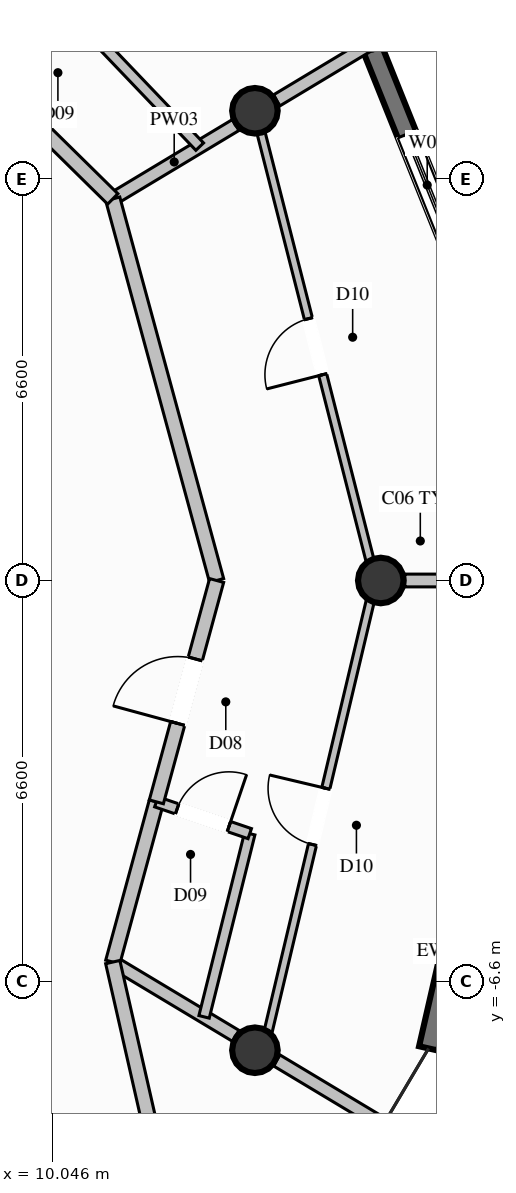
"""IFC4 building model, lengths in metres.
Left out: names, types, materials, properties, quantities, classifications, styles, units other than length and angle.
Written with IfcOpenShell. Run it as: python <this file> out.ifc"""

import sys

from ifc_helpers import new_model, si_unit, direction, frame, frame_2d, origin, origin_2d, place, context, subcontext, project, spatial, rectangle, circle, extrude, element, fill, save


model = new_model("IFC4")
c1 = context("Model", 3, precision=1e-05, world=origin(), true_north=direction((0.0, 1.0)))
c2 = subcontext(c1, "Body", "Model", "MODEL_VIEW")
j1 = project(units=[si_unit("LENGTHUNIT", "METRE"), si_unit("PLANEANGLEUNIT", "RADIAN")], contexts=[c1])
p1 = place(None, origin())
s1 = spatial("IfcSite", under=j1, at=p1, CompositionType="ELEMENT")
p2 = place(p1, origin())
s2 = spatial("IfcBuilding", under=s1, at=p2, CompositionType="ELEMENT")
p3 = place(p2, frame((0.0, 0.0, 246.8)))
s3 = spatial("IfcBuildingStorey", under=s2, at=p3, CompositionType="ELEMENT", Elevation=246.8)
for number, where, z_axis, x_axis in (
    (1, (15.45, 0.0, 0.0), (0.0, 0.0, 1.0), (1.0, 0.0, 0.0)),
    (2, (13.38, 7.725, 0.0), (0.0, 0.0, 1.0), (1.0, 0.0, 0.0)),
    (3, (13.38, -7.725, 0.0), (0.0, 0.0, 1.0), (1.0, 0.0, 0.0)),
):
    element("IfcColumn", number, at=place(p3, frame(where, z_axis=z_axis, x_axis=x_axis)), inside=s3, PredefinedType="COLUMN", context=c2, shape_type="SweptSolid", body=[
        extrude(circle(Radius=0.375, at=origin_2d()), origin(), (0.0, 0.0, 1.0), 3.8),
    ])
p4 = place(p3, frame((17.587, -1.795, 0.0), z_axis=(0.0, 0.0, 1.0), x_axis=(-0.223174159959, -0.974778587335, 0.0)))
e4 = element("IfcWall", 4, at=p4, inside=s3, PredefinedType="SOLIDWALL", context=c2, shape_type="SweptSolid", body=[
    extrude(rectangle(XDim=6.053, YDim=0.32, at=frame_2d((3.026, 0.0))), origin(), (0.0, 0.0, 1.0), 3.57),
])
p5 = place(p4, frame((2.126, 0.0, 0.35)))
e5 = element("IfcOpeningElement", 5, at=p5, cuts=e4, PredefinedType="OPENING", context=c2, shape_type="SweptSolid", body=[
    extrude(rectangle(XDim=1.8, YDim=2.6, at=frame_2d((0.9, 1.3))), frame((0.0, 0.17, 0.0), z_axis=(0.0, -1.0, 0.0), x_axis=(1.0, 0.0, 0.0)), (0.0, 0.0, 1.0), 0.34),
])
p6 = place(p3, frame((14.835, 9.939, 0.0), z_axis=(0.0, 0.0, 1.0), x_axis=(0.372412492589, -0.928067311871, 0.0)))
e6 = element("IfcWall", 6, at=p6, inside=s3, PredefinedType="SOLIDWALL", context=c2, shape_type="SweptSolid", body=[
    extrude(rectangle(XDim=6.095, YDim=0.32, at=frame_2d((3.048, 0.0))), origin(), (0.0, 0.0, 1.0), 3.57),
])
p7 = place(p6, frame((2.802, 0.0, 0.35)))
e7 = element("IfcOpeningElement", 7, at=p7, cuts=e6, PredefinedType="OPENING", context=c2, shape_type="SweptSolid", body=[
    extrude(rectangle(XDim=1.8, YDim=2.6, at=frame_2d((0.9, 1.3))), frame((0.0, 0.17, 0.0), z_axis=(0.0, -1.0, 0.0), x_axis=(1.0, 0.0, 0.0)), (0.0, 0.0, 1.0), 0.34),
])
p8 = place(p3, frame((11.042, 6.275, 0.0), z_axis=(0.0, 0.0, 1.0), x_axis=(0.857026686246, 0.515272024335, 0.0)))
e8 = element("IfcWall", 8, at=p8, inside=s3, PredefinedType="PARTITIONING", context=c2, shape_type="SweptSolid", body=[
    extrude(rectangle(XDim=2.358, YDim=0.21, at=frame_2d((1.179, 0.0))), origin(), (0.0, 0.0, 1.0), 3.011),
])
p9 = place(p3, frame((13.737, 7.895, 0.0), z_axis=(0.0, 0.0, 1.0), x_axis=(0.857150569961, 0.515065918514, 0.0)))
e9 = element("IfcWall", 9, at=p9, inside=s3, PredefinedType="PARTITIONING", context=c2, shape_type="SweptSolid", body=[
    extrude(rectangle(XDim=1.763, YDim=0.21, at=frame_2d((0.881, 0.0))), origin(), (0.0, 0.0, 1.0), 3.57),
])
p10 = place(p3, frame((11.042, -6.275, 0.0), z_axis=(0.0, 0.0, 1.0), x_axis=(0.857502061287, -0.514480529164, 0.0)))
e10 = element("IfcWall", 10, at=p10, inside=s3, PredefinedType="PARTITIONING", context=c2, shape_type="SweptSolid", body=[
    extrude(rectangle(XDim=2.358, YDim=0.21, at=frame_2d((1.179, 0.0))), origin(), (0.0, 0.0, 1.0), 3.011),
])
p11 = place(p3, frame((13.738, -7.892, 0.0), z_axis=(0.0, 0.0, 1.0), x_axis=(0.857407053578, -0.514638848587, 0.0)))
e11 = element("IfcWall", 11, at=p11, inside=s3, PredefinedType="PARTITIONING", context=c2, shape_type="SweptSolid", body=[
    extrude(rectangle(XDim=2.007, YDim=0.21, at=frame_2d((1.003, 0.0))), origin(), (0.0, 0.0, 1.0), 3.57),
])
p12 = place(p3, frame((11.042, -6.275, 0.0), z_axis=(0.0, 0.0, 1.0), x_axis=(0.262572701387, 0.964912211803, 0.0)))
e12 = element("IfcWall", 12, at=p12, inside=s3, PredefinedType="PARTITIONING", context=c2, shape_type="SweptSolid", body=[
    extrude(rectangle(XDim=2.731, YDim=0.24, at=frame_2d((1.365, 0.0))), origin(), (0.0, 0.0, 1.0), 3.57),
])
p13 = place(p3, frame((12.544, -7.176, 0.0), z_axis=(0.0, 0.0, 1.0), x_axis=(0.241851063072, 0.970313384062, 0.0)))
e13 = element("IfcWall", 13, at=p13, inside=s3, PredefinedType="PLUMBINGWALL", context=c2, shape_type="SweptSolid", body=[
    extrude(rectangle(XDim=3.105, YDim=0.175, at=frame_2d((1.553, 0.0))), origin(), (0.0, 0.0, 1.0), 3.57),
])
p14 = place(p3, frame((11.759, -3.64, 0.0), z_axis=(0.0, 0.0, 1.0), x_axis=(0.946586404748, -0.322450272671, 0.0)))
e14 = element("IfcWall", 14, at=p14, inside=s3, PredefinedType="PLUMBINGWALL", context=c2, shape_type="SweptSolid", body=[
    extrude(rectangle(XDim=1.623, YDim=0.175, at=frame_2d((0.811, 0.0))), origin(), (0.0, 0.0, 1.0), 3.57),
])
p15 = place(p14, frame((0.361, 0.0, 0.0)))
e15 = element("IfcOpeningElement", 15, at=p15, cuts=e14, PredefinedType="OPENING", context=c2, shape_type="SweptSolid", body=[
    extrude(rectangle(XDim=0.9, YDim=2.1, at=frame_2d((0.45, 1.05))), frame((0.0, 0.098, 0.0), z_axis=(0.0, -1.0, 0.0), x_axis=(1.0, 0.0, 0.0)), (0.0, 0.0, 1.0), 0.195),
])
p16 = place(p3, frame((15.845, 0.0, 0.0), z_axis=(0.0, 0.0, 1.0), x_axis=(1.0, 0.0, 0.0)))
e16 = element("IfcWall", 16, at=p16, inside=s3, PredefinedType="PARTITIONING", context=c2, shape_type="SweptSolid", body=[
    extrude(rectangle(XDim=1.56, YDim=0.21, at=frame_2d((0.78, 0.0))), origin(), (0.0, 0.0, 1.0), 3.57),
])
p17 = place(p3, frame((12.75, 0.0, 0.0), z_axis=(0.0, 0.0, 1.0), x_axis=(-0.262640884433, 0.964893655189, 0.0)))
e17 = element("IfcWall", 17, at=p17, inside=s3, PredefinedType="PARTITIONING", context=c2, shape_type="SweptSolid", body=[
    extrude(rectangle(XDim=6.503, YDim=0.24, at=frame_2d((3.251, 0.0))), origin(), (0.0, 0.0, 1.0), 3.57),
])
p18 = place(p3, frame((11.759, -3.64, 0.0), z_axis=(0.0, 0.0, 1.0), x_axis=(0.2626902414, 0.964880219029, 0.0)))
e18 = element("IfcWall", 18, at=p18, inside=s3, PredefinedType="PARTITIONING", context=c2, shape_type="SweptSolid", body=[
    extrude(rectangle(XDim=3.772, YDim=0.24, at=frame_2d((1.886, 0.0))), origin(), (0.0, 0.0, 1.0), 3.57),
])
p19 = place(p18, frame((1.336, 0.0, 0.0)))
e19 = element("IfcOpeningElement", 19, at=p19, cuts=e18, PredefinedType="OPENING", context=c2, shape_type="SweptSolid", body=[
    extrude(rectangle(XDim=1.1, YDim=2.3, at=frame_2d((0.55, 1.15))), frame((0.0, 0.13, 0.0), z_axis=(0.0, -1.0, 0.0), x_axis=(1.0, 0.0, 0.0)), (0.0, 0.0, 1.0), 0.26),
])
p20 = place(p3, frame((13.516, -7.759, 0.0), z_axis=(0.0, 0.0, 1.0), x_axis=(0.230840940032, 0.972991500685, 0.0)))
e20 = element("IfcWall", 20, at=p20, inside=s3, PredefinedType="PARTITIONING", context=c2, shape_type="SweptSolid", body=[
    extrude(rectangle(XDim=7.974, YDim=0.135, at=frame_2d((3.987, 0.0))), origin(), (0.0, 0.0, 1.0), 3.139),
])
p21 = place(p20, frame((3.512, 0.0, 0.0)))
e21 = element("IfcOpeningElement", 21, at=p21, cuts=e20, PredefinedType="OPENING", context=c2, shape_type="SweptSolid", body=[
    extrude(rectangle(XDim=0.95, YDim=2.1, at=frame_2d((0.475, 1.05))), frame((0.0, 0.078, 0.0), z_axis=(0.0, -1.0, 0.0), x_axis=(1.0, 0.0, 0.0)), (0.0, 0.0, 1.0), 0.155),
])
p22 = place(p3, frame((15.357, 0.0, 0.0), z_axis=(0.0, 0.0, 1.0), x_axis=(-0.246948201866, 0.969028681513, 0.0)))
e22 = element("IfcWall", 22, at=p22, inside=s3, PredefinedType="PARTITIONING", context=c2, shape_type="SweptSolid", body=[
    extrude(rectangle(XDim=7.937, YDim=0.135, at=frame_2d((3.968, 0.0))), origin(), (0.0, 0.0, 1.0), 3.139),
])
p23 = place(p22, frame((3.493, 0.0, 0.0)))
e23 = element("IfcOpeningElement", 23, at=p23, cuts=e22, PredefinedType="OPENING", context=c2, shape_type="SweptSolid", body=[
    extrude(rectangle(XDim=0.95, YDim=2.1, at=frame_2d((0.475, 1.05))), frame((0.0, 0.078, 0.0), z_axis=(0.0, -1.0, 0.0), x_axis=(1.0, 0.0, 0.0)), (0.0, 0.0, 1.0), 0.155),
])
p24 = place(p3, frame((11.042, 6.275, 0.0), z_axis=(0.0, 0.0, 1.0), x_axis=(-0.712677423321, 0.701491903224, 0.0)))
e24 = element("IfcWall", 24, at=p24, inside=s3, PredefinedType="PARTITIONING", context=c2, shape_type="SweptSolid", body=[
    extrude(rectangle(XDim=2.75, YDim=0.24, at=frame_2d((1.375, 0.0))), origin(), (0.0, 0.0, 1.0), 3.57),
])
p25 = place(p3, frame((12.472, 7.135, 0.0), z_axis=(0.0, 0.0, 1.0), x_axis=(-0.690671718567, 0.723168429324, 0.0)))
e25 = element("IfcWall", 25, at=p25, inside=s3, PredefinedType="PLUMBINGWALL", context=c2, shape_type="SweptSolid", body=[
    extrude(rectangle(XDim=3.14, YDim=0.175, at=frame_2d((1.57, 0.0))), origin(), (0.0, 0.0, 1.0), 3.57),
])
p26 = place(p3, frame((9.082, 8.204, 0.0), z_axis=(0.0, 0.0, 1.0), x_axis=(0.712642440828, 0.701527441751, 0.0)))
e26 = element("IfcWall", 26, at=p26, inside=s3, PredefinedType="PLUMBINGWALL", context=c2, shape_type="SweptSolid", body=[
    extrude(rectangle(XDim=1.713, YDim=0.175, at=frame_2d((0.857, 0.0))), origin(), (0.0, 0.0, 1.0), 3.57),
])
p27 = place(p26, frame((0.407, 0.0, 0.0)))
e27 = element("IfcOpeningElement", 27, at=p27, cuts=e26, PredefinedType="OPENING", context=c2, shape_type="SweptSolid", body=[
    extrude(rectangle(XDim=0.9, YDim=2.1, at=frame_2d((0.45, 1.05))), frame((0.0, 0.098, 0.0), z_axis=(0.0, -1.0, 0.0), x_axis=(1.0, 0.0, 0.0)), (0.0, 0.0, 1.0), 0.195),
])
p28 = place(p3, frame((12.3, -11.8, 0.0), z_axis=(0.0, 0.0, 1.0), x_axis=(-0.222014008723, 0.975043475918, 0.0)))
e28 = element("IfcWall", 28, at=p28, inside=s3, PredefinedType="PARTITIONING", context=c2, shape_type="SweptSolid", body=[
    extrude(rectangle(XDim=5.667, YDim=0.24, at=frame_2d((2.833, 0.0))), origin(), (0.0, 0.0, 1.0), 3.57),
])
p29 = place(p7, origin())
e29 = element("IfcWindow", 29, at=p29, inside=s3, PartitioningType="SINGLE_PANEL", PredefinedType="WINDOW", context=c2, shape_type="SweptSolid", body=[
    extrude(rectangle(XDim=1.8, YDim=2.6, at=frame_2d((0.9, 1.3))), frame((0.0, 0.03, 0.0), z_axis=(0.0, -1.0, 0.0), x_axis=(1.0, 0.0, 0.0)), (0.0, 0.0, 1.0), 0.06),
])
fill(e7, e29)
p30 = place(p15, origin())
e30 = element("IfcDoor", 30, at=p30, inside=s3, OperationType="SINGLE_SWING_RIGHT", PredefinedType="DOOR", context=c2, shape_type="SweptSolid", body=[
    extrude(rectangle(XDim=0.9, YDim=2.1, at=frame_2d((0.45, 1.05))), frame((0.0, 0.025, 0.0), z_axis=(0.0, -1.0, 0.0), x_axis=(1.0, 0.0, 0.0)), (0.0, 0.0, 1.0), 0.05),
])
fill(e15, e30)
p31 = place(p19, origin())
e31 = element("IfcDoor", 31, at=p31, inside=s3, OperationType="SINGLE_SWING_LEFT", PredefinedType="DOOR", context=c2, shape_type="SweptSolid", body=[
    extrude(rectangle(XDim=1.1, YDim=2.3, at=frame_2d((0.55, 1.15))), frame((0.0, 0.025, 0.0), z_axis=(0.0, -1.0, 0.0), x_axis=(1.0, 0.0, 0.0)), (0.0, 0.0, 1.0), 0.05),
])
fill(e19, e31)
p32 = place(p21, origin())
e32 = element("IfcDoor", 32, at=p32, inside=s3, OperationType="SINGLE_SWING_RIGHT", PredefinedType="DOOR", context=c2, shape_type="SweptSolid", body=[
    extrude(rectangle(XDim=0.95, YDim=2.1, at=frame_2d((0.475, 1.05))), frame((0.0, 0.025, 0.0), z_axis=(0.0, -1.0, 0.0), x_axis=(1.0, 0.0, 0.0)), (0.0, 0.0, 1.0), 0.05),
])
fill(e21, e32)
p33 = place(p23, origin())
e33 = element("IfcDoor", 33, at=p33, inside=s3, OperationType="SINGLE_SWING_LEFT", PredefinedType="DOOR", context=c2, shape_type="SweptSolid", body=[
    extrude(rectangle(XDim=0.95, YDim=2.1, at=frame_2d((0.475, 1.05))), frame((0.0, 0.025, 0.0), z_axis=(0.0, -1.0, 0.0), x_axis=(1.0, 0.0, 0.0)), (0.0, 0.0, 1.0), 0.05),
])
fill(e23, e33)
save(model, sys.argv[1])
